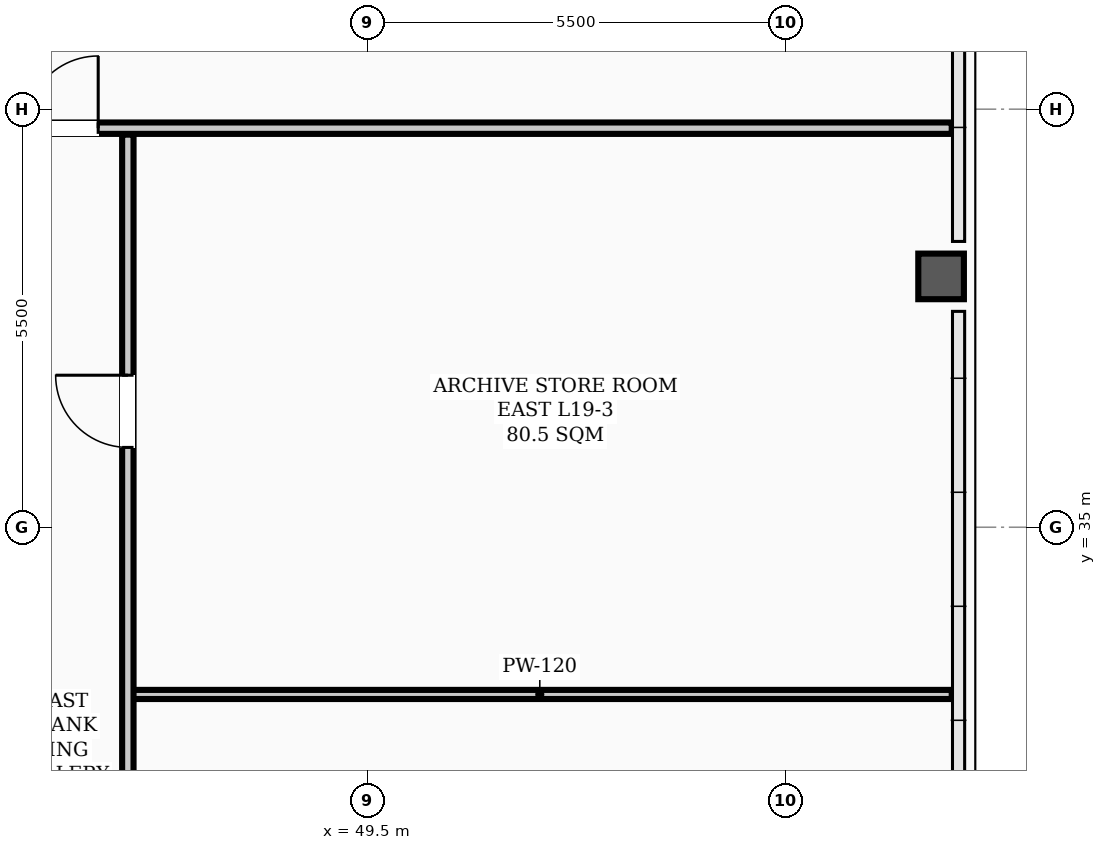
"""IFC4 building model, lengths in metres.
Left out: names, types, materials, properties, quantities, classifications, styles, units other than length and angle.
Written with IfcOpenShell. Run it as: python <this file> out.ifc"""

import sys

from ifc_helpers import new_model, si_unit, direction, frame, frame_2d, origin, origin_2d, place, context, subcontext, project, spatial, rectangle, hollow_rectangle, extrude, element, fill, save


model = new_model("IFC4")
c1 = context("Model", 3, precision=1e-05, world=origin(), true_north=direction((0.0, 1.0)))
c2 = subcontext(c1, "Body", "Model", "MODEL_VIEW")
j1 = project(units=[si_unit("LENGTHUNIT", "METRE"), si_unit("PLANEANGLEUNIT", "RADIAN")], contexts=[c1])
p1 = place(None, origin())
s1 = spatial("IfcSite", under=j1, at=p1, CompositionType="ELEMENT")
p2 = place(p1, origin())
s2 = spatial("IfcBuilding", under=s1, at=p2, CompositionType="ELEMENT")
p3 = place(p2, frame((0.0, 0.0, 77.2)))
s3 = spatial("IfcBuildingStorey", under=s2, at=p3, CompositionType="ELEMENT", Elevation=77.2)
p4 = place(p3, frame((57.05, 38.3, 0.0), z_axis=(0.0, 0.0, 1.0), x_axis=(1.0, 0.0, 0.0)))
e1 = element("IfcColumn", 1, at=p4, inside=s3, PredefinedType="COLUMN", context=c2, shape_type="SweptSolid", body=[
    extrude(hollow_rectangle(XDim=0.6, YDim=0.6, WallThickness=0.026, InnerFilletRadius=0.013, OuterFilletRadius=0.039, at=origin_2d()), origin(), (0.0, 0.0, 1.0), 3.9),
])
p5 = place(p3, frame((46.35, 32.8, 0.0), z_axis=(0.0, 0.0, 1.0), x_axis=(1.0, 0.0, 0.0)))
e2 = element("IfcWall", 2, at=p5, inside=s3, PredefinedType="PARTITIONING", context=c2, shape_type="SweptSolid", body=[
    extrude(rectangle(XDim=10.84, YDim=0.12, at=frame_2d((5.42, 0.0))), origin(), (0.0, 0.0, 1.0), 2.24),
])
p6 = place(p3, frame((7.81, 40.25, 0.0), z_axis=(0.0, 0.0, 1.0), x_axis=(1.0, 0.0, 0.0)))
e3 = element("IfcWall", 3, at=p6, inside=s3, PredefinedType="PARTITIONING", context=c2, shape_type="SweptSolid", body=[
    extrude(rectangle(XDim=49.38, YDim=0.15, at=frame_2d((24.69, 0.0))), origin(), (0.0, 0.0, 1.0), 2.24),
])
p7 = place(p6, frame((3.73, 0.0, 0.0)))
e4 = element("IfcOpeningElement", 4, at=p7, cuts=e3, PredefinedType="OPENING", context=c2, shape_type="SweptSolid", body=[
    extrude(rectangle(XDim=0.95, YDim=2.08, at=frame_2d((0.475, 1.04))), frame((0.0, 0.085, 0.0), z_axis=(0.0, -1.0, 0.0), x_axis=(1.0, 0.0, 0.0)), (0.0, 0.0, 1.0), 0.17),
])
p8 = place(p6, frame((18.115, 0.0, 0.0)))
e5 = element("IfcOpeningElement", 5, at=p8, cuts=e3, PredefinedType="OPENING", context=c2, shape_type="SweptSolid", body=[
    extrude(rectangle(XDim=0.95, YDim=2.08, at=frame_2d((0.475, 1.04))), frame((0.0, 0.085, 0.0), z_axis=(0.0, -1.0, 0.0), x_axis=(1.0, 0.0, 0.0)), (0.0, 0.0, 1.0), 0.17),
])
p9 = place(p6, frame((27.415, 0.0, 0.0)))
e6 = element("IfcOpeningElement", 6, at=p9, cuts=e3, PredefinedType="OPENING", context=c2, shape_type="SweptSolid", body=[
    extrude(rectangle(XDim=0.95, YDim=2.08, at=frame_2d((0.475, 1.04))), frame((0.0, 0.085, 0.0), z_axis=(0.0, -1.0, 0.0), x_axis=(1.0, 0.0, 0.0)), (0.0, 0.0, 1.0), 0.17),
])
p10 = place(p6, frame((37.2, 0.0, 0.0)))
e7 = element("IfcOpeningElement", 7, at=p10, cuts=e3, PredefinedType="OPENING", context=c2, shape_type="SweptSolid", body=[
    extrude(rectangle(XDim=0.95, YDim=2.08, at=frame_2d((0.475, 1.04))), frame((0.0, 0.085, 0.0), z_axis=(0.0, -1.0, 0.0), x_axis=(1.0, 0.0, 0.0)), (0.0, 0.0, 1.0), 0.17),
])
p11 = place(p3, frame((46.35, 17.635, 0.0), z_axis=(0.0, 0.0, 1.0), x_axis=(0.0, 1.0, 0.0)))
e8 = element("IfcWall", 8, at=p11, inside=s3, PredefinedType="PARTITIONING", context=c2, shape_type="SweptSolid", body=[
    extrude(rectangle(XDim=22.53, YDim=0.15, at=frame_2d((11.265, 0.0))), origin(), (0.0, 0.0, 1.0), 2.24),
])
p12 = place(p11, frame((3.865, 0.0, 0.0)))
e9 = element("IfcOpeningElement", 9, at=p12, cuts=e8, PredefinedType="OPENING", context=c2, shape_type="SweptSolid", body=[
    extrude(rectangle(XDim=0.95, YDim=2.08, at=frame_2d((0.475, 1.04))), frame((0.0, 0.085, 0.0), z_axis=(0.0, -1.0, 0.0), x_axis=(1.0, 0.0, 0.0)), (0.0, 0.0, 1.0), 0.17),
])
p13 = place(p11, frame((9.49, 0.0, 0.0)))
e10 = element("IfcOpeningElement", 10, at=p13, cuts=e8, PredefinedType="OPENING", context=c2, shape_type="SweptSolid", body=[
    extrude(rectangle(XDim=0.95, YDim=2.08, at=frame_2d((0.475, 1.04))), frame((0.0, 0.085, 0.0), z_axis=(0.0, -1.0, 0.0), x_axis=(1.0, 0.0, 0.0)), (0.0, 0.0, 1.0), 0.17),
])
p14 = place(p11, frame((18.415, 0.0, 0.0)))
e11 = element("IfcOpeningElement", 11, at=p14, cuts=e8, PredefinedType="OPENING", context=c2, shape_type="SweptSolid", body=[
    extrude(rectangle(XDim=0.95, YDim=2.08, at=frame_2d((0.475, 1.04))), frame((0.0, 0.085, 0.0), z_axis=(0.0, -1.0, 0.0), x_axis=(1.0, 0.0, 0.0)), (0.0, 0.0, 1.0), 0.17),
])
p15 = place(p14, origin())
e12 = element("IfcDoor", 12, at=p15, inside=s3, OperationType="SINGLE_SWING_RIGHT", PredefinedType="DOOR", context=c2, shape_type="SweptSolid", body=[
    extrude(rectangle(XDim=0.95, YDim=2.08, at=frame_2d((0.475, 1.04))), frame((0.0, 0.025, 0.0), z_axis=(0.0, -1.0, 0.0), x_axis=(1.0, 0.0, 0.0)), (0.0, 0.0, 1.0), 0.05),
])
fill(e11, e12)
p16 = place(p10, origin())
e13 = element("IfcDoor", 13, at=p16, inside=s3, OperationType="SINGLE_SWING_RIGHT", PredefinedType="DOOR", context=c2, shape_type="SweptSolid", body=[
    extrude(rectangle(XDim=0.95, YDim=2.08, at=frame_2d((0.475, 1.04))), frame((0.0, 0.025, 0.0), z_axis=(0.0, -1.0, 0.0), x_axis=(1.0, 0.0, 0.0)), (0.0, 0.0, 1.0), 0.05),
])
fill(e7, e13)
save(model, sys.argv[1])
